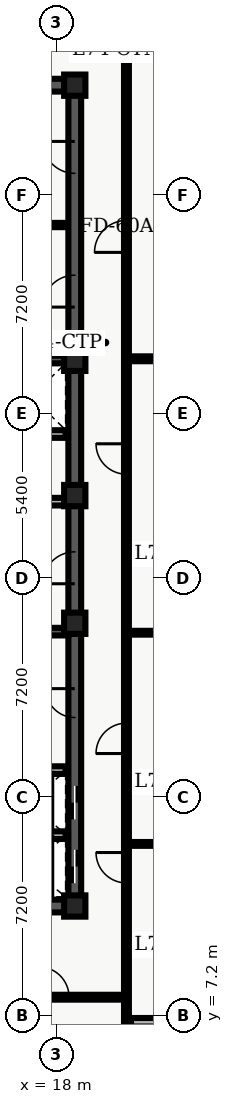
"""IFC4 building model, lengths in metres.
Left out: names, types, materials, properties, quantities, classifications, styles, units other than length and angle.
Written with IfcOpenShell. Run it as: python <this file> out.ifc"""

import sys

from ifc_helpers import new_model, entity, si_unit, converted_unit, direction, frame, origin_with_axes, origin_2d_with_axis, place, context, subcontext, project, spatial, polyline, rectangle, outline, extrude, element, fill, save


model = new_model("IFC4")
c1 = context("Model", 3, precision=1e-05, world=origin_with_axes(), true_north=direction((0.0, 1.0)))
c2 = subcontext(c1, "Body", "Model", "MODEL_VIEW")
j1 = project(units=[si_unit("LENGTHUNIT", "METRE"), converted_unit("PLANEANGLEUNIT", "DEGREE", entity("IfcPlaneAngleMeasure", 0.017), si_unit("PLANEANGLEUNIT", "RADIAN"), dimensions=[0, 0, 0, 0, 0, 0, 0])], contexts=[c1])
p1 = place(None, origin_with_axes())
s1 = spatial("IfcSite", under=j1, at=p1, CompositionType="ELEMENT")
p2 = place(p1, origin_with_axes())
s2 = spatial("IfcBuilding", under=s1, at=p2, CompositionType="ELEMENT")
p3 = place(p2, frame((0.0, 0.0, 299.7), z_axis=(0.0, 0.0, 1.0), x_axis=(1.0, 0.0, 0.0)))
s3 = spatial("IfcBuildingStorey", under=s2, at=p3, CompositionType="ELEMENT", Elevation=299.7)
p4 = place(p3, frame((11.4, 10.8, 0.0), z_axis=(0.0, 0.0, 1.0), x_axis=(1.0, 0.0, 0.0)))
e1 = element("IfcWall", 1, at=p4, inside=s3, PredefinedType="SHEAR", context=c2, shape_type="SweptSolid", body=[
    extrude(outline(polyline([(0.0, -0.21), (7.2, -0.21), (7.2, 0.21), (0.0, 0.21), (0.0, -0.21)])), origin_with_axes(), (0.0, 0.0, 1.0), 3.6),
])
p5 = place(p4, frame((2.625, 0.0, 0.0), z_axis=(0.0, 0.0, 1.0), x_axis=(1.0, 0.0, 0.0)))
e2 = element("IfcOpeningElement", 2, at=p5, cuts=e1, PredefinedType="OPENING", context=c2, shape_type="SweptSolid", body=[
    extrude(rectangle(XDim=1.05, YDim=0.44, at=origin_2d_with_axis()), origin_with_axes(), (0.0, 0.0, 1.0), 2.15),
])
p6 = place(p3, frame((11.4, 37.8, 0.0), z_axis=(0.0, 0.0, 1.0), x_axis=(1.0, 0.0, 0.0)))
e3 = element("IfcWall", 3, at=p6, inside=s3, PredefinedType="SHEAR", context=c2, shape_type="SweptSolid", body=[
    extrude(outline(polyline([(0.0, -0.21), (7.2, -0.21), (7.2, 0.21), (0.0, 0.21), (0.0, -0.21)])), origin_with_axes(), (0.0, 0.0, 1.0), 3.6),
])
p7 = place(p6, frame((2.625, 0.0, 0.0), z_axis=(0.0, 0.0, 1.0), x_axis=(1.0, 0.0, 0.0)))
e4 = element("IfcOpeningElement", 4, at=p7, cuts=e3, PredefinedType="OPENING", context=c2, shape_type="SweptSolid", body=[
    extrude(rectangle(XDim=1.05, YDim=0.44, at=origin_2d_with_axis()), origin_with_axes(), (0.0, 0.0, 1.0), 2.15),
])
p8 = place(p3, frame((18.6, 10.8, 0.0), z_axis=(0.0, 0.0, 1.0), x_axis=(0.0, 1.0, 0.0)))
e5 = element("IfcWall", 5, at=p8, inside=s3, PredefinedType="SHEAR", context=c2, shape_type="SweptSolid", body=[
    extrude(outline(polyline([(0.0, -0.21), (13.5, -0.21), (13.5, 0.21), (0.0, 0.21), (0.0, -0.21)])), origin_with_axes(), (0.0, 0.0, 1.0), 3.6),
])
p9 = place(p8, frame((1.3, 0.0, 0.0), z_axis=(0.0, 0.0, 1.0), x_axis=(1.0, 0.0, 0.0)))
e6 = element("IfcOpeningElement", 6, at=p9, cuts=e5, PredefinedType="OPENING", context=c2, shape_type="SweptSolid", body=[
    extrude(rectangle(XDim=1.1, YDim=0.44, at=origin_2d_with_axis()), origin_with_axes(), (0.0, 0.0, 1.0), 2.15),
])
p10 = place(p8, frame((3.4, 0.0, 0.0), z_axis=(0.0, 0.0, 1.0), x_axis=(1.0, 0.0, 0.0)))
e7 = element("IfcOpeningElement", 7, at=p10, cuts=e5, PredefinedType="OPENING", context=c2, shape_type="SweptSolid", body=[
    extrude(rectangle(XDim=1.1, YDim=0.44, at=origin_2d_with_axis()), origin_with_axes(), (0.0, 0.0, 1.0), 2.15),
])
p11 = place(p8, frame((11.125, 0.0, 0.0), z_axis=(0.0, 0.0, 1.0), x_axis=(1.0, 0.0, 0.0)))
e8 = element("IfcOpeningElement", 8, at=p11, cuts=e5, PredefinedType="OPENING", context=c2, shape_type="SweptSolid", body=[
    extrude(rectangle(XDim=1.05, YDim=0.44, at=origin_2d_with_axis()), origin_with_axes(), (0.0, 0.0, 1.0), 2.15),
])
p12 = place(p8, frame((6.675, 0.0, 0.0), z_axis=(0.0, 0.0, 1.0), x_axis=(1.0, 0.0, 0.0)))
e9 = element("IfcOpeningElement", 9, at=p12, cuts=e5, PredefinedType="OPENING", context=c2, shape_type="SweptSolid", body=[
    extrude(rectangle(XDim=0.95, YDim=0.44, at=origin_2d_with_axis()), origin_with_axes(), (0.0, 0.0, 1.0), 2.15),
])
p13 = place(p3, frame((18.6, 24.3, 0.0), z_axis=(0.0, 0.0, 1.0), x_axis=(0.0, 1.0, 0.0)))
e10 = element("IfcWall", 10, at=p13, inside=s3, PredefinedType="SHEAR", context=c2, shape_type="SweptSolid", body=[
    extrude(outline(polyline([(0.0, -0.21), (13.5, -0.21), (13.5, 0.21), (0.0, 0.21), (0.0, -0.21)])), origin_with_axes(), (0.0, 0.0, 1.0), 3.6),
])
p14 = place(p13, frame((6.725, 0.0, 0.0), z_axis=(0.0, 0.0, 1.0), x_axis=(1.0, 0.0, 0.0)))
e11 = element("IfcOpeningElement", 11, at=p14, cuts=e10, PredefinedType="OPENING", context=c2, shape_type="SweptSolid", body=[
    extrude(rectangle(XDim=1.05, YDim=0.44, at=origin_2d_with_axis()), origin_with_axes(), (0.0, 0.0, 1.0), 2.15),
])
p15 = place(p13, frame((11.125, 0.0, 0.0), z_axis=(0.0, 0.0, 1.0), x_axis=(1.0, 0.0, 0.0)))
e12 = element("IfcOpeningElement", 12, at=p15, cuts=e10, PredefinedType="OPENING", context=c2, shape_type="SweptSolid", body=[
    extrude(rectangle(XDim=1.05, YDim=0.44, at=origin_2d_with_axis()), origin_with_axes(), (0.0, 0.0, 1.0), 2.15),
])
for number, where, z_axis, x_axis in (
    (13, (11.61, 19.825, 0.0), (0.0, 0.0, 1.0), (1.0, 0.0, 0.0)),
    (14, (11.61, 28.775, 0.0), (0.0, 0.0, 1.0), (1.0, 0.0, 0.0)),
):
    element("IfcWall", number, at=place(p3, frame(where, z_axis=z_axis, x_axis=x_axis)), inside=s3, PredefinedType="SHEAR", context=c2, shape_type="SweptSolid", body=[
        extrude(outline(polyline([(0.0, -0.125), (6.78, -0.125), (6.78, 0.125), (0.0, 0.125), (0.0, -0.125)])), origin_with_axes(), (0.0, 0.0, 1.0), 3.6),
    ])
p16 = place(p3, frame((11.7, 24.1, 0.0), z_axis=(0.0, 0.0, 1.0), x_axis=(1.0, 0.0, 0.0)))
e15 = element("IfcWall", 15, at=p16, inside=s3, PredefinedType="SOLIDWALL", context=c2, shape_type="SweptSolid", body=[
    extrude(outline(polyline([(0.0, -0.125), (6.6, -0.125), (6.6, 0.125), (0.0, 0.125), (0.0, -0.125)])), origin_with_axes(), (0.0, 0.0, 1.0), 2.64),
])
p17 = place(p16, frame((3.6, 0.0, 0.0), z_axis=(0.0, 0.0, 1.0), x_axis=(1.0, 0.0, 0.0)))
e16 = element("IfcOpeningElement", 16, at=p17, cuts=e15, PredefinedType="OPENING", context=c2, shape_type="SweptSolid", body=[
    extrude(rectangle(XDim=0.9, YDim=0.27, at=origin_2d_with_axis()), origin_with_axes(), (0.0, 0.0, 1.0), 2.15),
])
p18 = place(p16, frame((5.65, 0.0, 0.0), z_axis=(0.0, 0.0, 1.0), x_axis=(1.0, 0.0, 0.0)))
e17 = element("IfcOpeningElement", 17, at=p18, cuts=e15, PredefinedType="OPENING", context=c2, shape_type="SweptSolid", body=[
    extrude(rectangle(XDim=0.9, YDim=0.27, at=origin_2d_with_axis()), origin_with_axes(), (0.0, 0.0, 1.0), 2.15),
])
p19 = place(p3, frame((11.7, 26.325, 0.0), z_axis=(0.0, 0.0, 1.0), x_axis=(1.0, 0.0, 0.0)))
e18 = element("IfcWall", 18, at=p19, inside=s3, PredefinedType="SOLIDWALL", context=c2, shape_type="SweptSolid", body=[
    extrude(outline(polyline([(0.0, -0.125), (6.6, -0.125), (6.6, 0.125), (0.0, 0.125), (0.0, -0.125)])), origin_with_axes(), (0.0, 0.0, 1.0), 2.64),
])
p20 = place(p19, frame((3.5, 0.0, 0.0), z_axis=(0.0, 0.0, 1.0), x_axis=(1.0, 0.0, 0.0)))
e19 = element("IfcOpeningElement", 19, at=p20, cuts=e18, PredefinedType="OPENING", context=c2, shape_type="SweptSolid", body=[
    extrude(rectangle(XDim=0.9, YDim=0.27, at=origin_2d_with_axis()), origin_with_axes(), (0.0, 0.0, 1.0), 2.15),
])
for number, where, z_axis, x_axis in (
    (20, (18.6, 10.8, 0.0), (0.0, 0.0, 1.0), (1.0, 0.0, 0.0)),
    (21, (18.6, 20.1, 0.0), (0.0, 0.0, 1.0), (1.0, 0.0, 0.0)),
    (22, (18.6, 24.3, 0.0), (0.0, 0.0, 1.0), (1.0, 0.0, 0.0)),
    (23, (18.6, 28.75, 0.0), (0.0, 0.0, 1.0), (1.0, 0.0, 0.0)),
    (24, (18.6, 37.8, 0.0), (0.0, 0.0, 1.0), (1.0, 0.0, 0.0)),
):
    element("IfcColumn", number, at=place(p3, frame(where, z_axis=z_axis, x_axis=x_axis)), inside=s3, PredefinedType="COLUMN", context=c2, shape_type="SweptSolid", body=[
        extrude(rectangle(XDim=0.7, YDim=0.7, at=origin_2d_with_axis()), origin_with_axes(), (0.0, 0.0, 1.0), 3.9),
    ])
for number, where, z_axis, x_axis in (
    (25, (15.84, 13.13, 0.0), (0.0, 0.0, 1.0), (1.0, 0.0, 0.0)),
    (26, (15.84, 15.27, 0.0), (0.0, 0.0, 1.0), (1.0, 0.0, 0.0)),
):
    element("IfcWall", number, at=place(p3, frame(where, z_axis=z_axis, x_axis=x_axis)), inside=s3, PredefinedType="SOLIDWALL", context=c2, shape_type="SweptSolid", body=[
        extrude(outline(polyline([(0.0, -0.125), (2.46, -0.125), (2.46, 0.125), (0.0, 0.125), (0.0, -0.125)])), origin_with_axes(), (0.0, 0.0, 1.0), 2.64),
    ])
p21 = place(p3, frame((15.84, 33.2, 0.0), z_axis=(0.0, 0.0, 1.0), x_axis=(1.0, 0.0, 0.0)))
e27 = element("IfcWall", 27, at=p21, inside=s3, PredefinedType="PARTITIONING", context=c2, shape_type="SweptSolid", body=[
    extrude(outline(polyline([(0.0, -0.07), (2.46, -0.07), (2.46, 0.07), (0.0, 0.07), (0.0, -0.07)])), origin_with_axes(), (0.0, 0.0, 1.0), 2.64),
])
p22 = place(p3, frame((8.135, 7.8, 0.0), z_axis=(0.0, 0.0, 1.0), x_axis=(1.0, 0.0, 0.0)))
e28 = element("IfcWall", 28, at=p22, inside=s3, PredefinedType="PARTITIONING", context=c2, shape_type="SweptSolid", body=[
    extrude(outline(polyline([(0.0, -0.08), (12.165, -0.08), (12.165, 0.08), (0.0, 0.08), (0.0, -0.08)])), origin_with_axes(), (0.0, 0.0, 1.0), 2.64),
])
p23 = place(p22, frame((0.89, 0.0, 0.0), z_axis=(0.0, 0.0, 1.0), x_axis=(1.0, 0.0, 0.0)))
e29 = element("IfcOpeningElement", 29, at=p23, cuts=e28, PredefinedType="OPENING", context=c2, shape_type="SweptSolid", body=[
    extrude(rectangle(XDim=1.0, YDim=0.18, at=origin_2d_with_axis()), origin_with_axes(), (0.0, 0.0, 1.0), 2.15),
])
p24 = place(p22, frame((5.482, 0.0, 0.0), z_axis=(0.0, 0.0, 1.0), x_axis=(1.0, 0.0, 0.0)))
e30 = element("IfcOpeningElement", 30, at=p24, cuts=e28, PredefinedType="OPENING", context=c2, shape_type="SweptSolid", body=[
    extrude(rectangle(XDim=1.0, YDim=0.18, at=origin_2d_with_axis()), origin_with_axes(), (0.0, 0.0, 1.0), 2.15),
])
p25 = place(p22, frame((9.777, 0.0, 0.0), z_axis=(0.0, 0.0, 1.0), x_axis=(1.0, 0.0, 0.0)))
e31 = element("IfcOpeningElement", 31, at=p25, cuts=e28, PredefinedType="OPENING", context=c2, shape_type="SweptSolid", body=[
    extrude(rectangle(XDim=1.0, YDim=0.18, at=origin_2d_with_axis()), origin_with_axes(), (0.0, 0.0, 1.0), 2.15),
])
p26 = place(p3, frame((20.3, 2.14, 0.0), z_axis=(0.0, 0.0, 1.0), x_axis=(0.0, 1.0, 0.0)))
e32 = element("IfcWall", 32, at=p26, inside=s3, PredefinedType="PARTITIONING", context=c2, shape_type="SweptSolid", body=[
    extrude(outline(polyline([(0.0, -0.08), (38.36, -0.08), (38.36, 0.08), (0.0, 0.08), (0.0, -0.08)])), origin_with_axes(), (0.0, 0.0, 1.0), 2.64),
])
p27 = place(p26, frame((30.685, 0.0, 0.0), z_axis=(0.0, 0.0, 1.0), x_axis=(1.0, 0.0, 0.0)))
e33 = element("IfcOpeningElement", 33, at=p27, cuts=e32, PredefinedType="OPENING", context=c2, shape_type="SweptSolid", body=[
    extrude(rectangle(XDim=1.05, YDim=0.18, at=origin_2d_with_axis()), origin_with_axes(), (0.0, 0.0, 1.0), 2.15),
])
p28 = place(p26, frame((2.683, 0.0, 0.0), z_axis=(0.0, 0.0, 1.0), x_axis=(1.0, 0.0, 0.0)))
e34 = element("IfcOpeningElement", 34, at=p28, cuts=e32, PredefinedType="OPENING", context=c2, shape_type="SweptSolid", body=[
    extrude(rectangle(XDim=1.0, YDim=0.18, at=origin_2d_with_axis()), origin_with_axes(), (0.0, 0.0, 1.0), 2.15),
])
p29 = place(p26, frame((9.919, 0.0, 0.0), z_axis=(0.0, 0.0, 1.0), x_axis=(1.0, 0.0, 0.0)))
e35 = element("IfcOpeningElement", 35, at=p29, cuts=e32, PredefinedType="OPENING", context=c2, shape_type="SweptSolid", body=[
    extrude(rectangle(XDim=1.0, YDim=0.18, at=origin_2d_with_axis()), origin_with_axes(), (0.0, 0.0, 1.0), 2.15),
])
p30 = place(p26, frame((14.175, 0.0, 0.0), z_axis=(0.0, 0.0, 1.0), x_axis=(1.0, 0.0, 0.0)))
e36 = element("IfcOpeningElement", 36, at=p30, cuts=e32, PredefinedType="OPENING", context=c2, shape_type="SweptSolid", body=[
    extrude(rectangle(XDim=1.0, YDim=0.18, at=origin_2d_with_axis()), origin_with_axes(), (0.0, 0.0, 1.0), 2.15),
])
p31 = place(p26, frame((23.364, 0.0, 0.0), z_axis=(0.0, 0.0, 1.0), x_axis=(1.0, 0.0, 0.0)))
e37 = element("IfcOpeningElement", 37, at=p31, cuts=e32, PredefinedType="OPENING", context=c2, shape_type="SweptSolid", body=[
    extrude(rectangle(XDim=1.0, YDim=0.18, at=origin_2d_with_axis()), origin_with_axes(), (0.0, 0.0, 1.0), 2.15),
])
p32 = place(p3, frame((20.3, 28.8, 0.0), z_axis=(0.0, 0.0, 1.0), x_axis=(1.0, 0.0, 0.0)))
e38 = element("IfcWall", 38, at=p32, inside=s3, PredefinedType="PARTITIONING", context=c2, shape_type="SweptSolid", body=[
    extrude(outline(polyline([(0.0, -0.08), (3.32, -0.08), (3.32, 0.08), (0.0, 0.08), (0.0, -0.08)])), origin_with_axes(), (0.0, 0.0, 1.0), 2.64),
])
p33 = place(p3, frame((20.45, 6.976, 0.0), z_axis=(0.0, 0.0, 1.0), x_axis=(1.0, 0.0, 0.0)))
e39 = element("IfcWall", 39, at=p33, inside=s3, PredefinedType="PARTITIONING", context=c2, shape_type="SweptSolid", body=[
    extrude(outline(polyline([(0.0, -0.14), (13.415, -0.14), (13.415, 0.14), (0.0, 0.14), (0.0, -0.14)])), origin_with_axes(), (0.0, 0.0, 1.0), 2.64),
])
for number, where, z_axis, x_axis in (
    (40, (20.45, 12.842, 0.0), (0.0, 0.0, 1.0), (1.0, 0.0, 0.0)),
    (41, (20.45, 19.789, 0.0), (0.0, 0.0, 1.0), (1.0, 0.0, 0.0)),
):
    element("IfcWall", number, at=place(p3, frame(where, z_axis=z_axis, x_axis=x_axis)), inside=s3, PredefinedType="PARTITIONING", context=c2, shape_type="SweptSolid", body=[
        extrude(outline(polyline([(0.0, -0.062), (13.415, -0.062), (13.415, 0.062), (0.0, 0.062), (0.0, -0.062)])), origin_with_axes(), (0.0, 0.0, 1.0), 2.64),
    ])
p34 = place(p8, frame((1.3, 0.0, 0.0), z_axis=(0.0, 0.0, 1.0), x_axis=(1.0, 0.0, 0.0)))
e42 = element("IfcDoor", 42, at=p34, inside=s3, OperationType="SLIDING_TO_LEFT", PredefinedType="DOOR", context=c2, shape_type="SweptSolid", body=[
    extrude(rectangle(XDim=1.1, YDim=0.09, at=origin_2d_with_axis()), origin_with_axes(), (0.0, 0.0, 1.0), 2.15),
])
fill(e6, e42)
p35 = place(p8, frame((3.4, 0.0, 0.0), z_axis=(0.0, 0.0, 1.0), x_axis=(1.0, 0.0, 0.0)))
e43 = element("IfcDoor", 43, at=p35, inside=s3, OperationType="SLIDING_TO_RIGHT", PredefinedType="DOOR", context=c2, shape_type="SweptSolid", body=[
    extrude(rectangle(XDim=1.1, YDim=0.09, at=origin_2d_with_axis()), origin_with_axes(), (0.0, 0.0, 1.0), 2.15),
])
fill(e7, e43)
p36 = place(p8, frame((11.125, 0.0, 0.0), z_axis=(0.0, 0.0, 1.0), x_axis=(1.0, 0.0, 0.0)))
e44 = element("IfcDoor", 44, at=p36, inside=s3, OperationType="SINGLE_SWING_LEFT", PredefinedType="DOOR", context=c2, shape_type="SweptSolid", body=[
    extrude(rectangle(XDim=1.05, YDim=0.09, at=origin_2d_with_axis()), origin_with_axes(), (0.0, 0.0, 1.0), 2.15),
])
fill(e8, e44)
p37 = place(p8, frame((6.675, 0.0, 0.0), z_axis=(0.0, 0.0, 1.0), x_axis=(1.0, 0.0, 0.0)))
e45 = element("IfcDoor", 45, at=p37, inside=s3, OperationType="SINGLE_SWING_RIGHT", PredefinedType="DOOR", context=c2, shape_type="SweptSolid", body=[
    extrude(rectangle(XDim=0.95, YDim=0.09, at=origin_2d_with_axis()), origin_with_axes(), (0.0, 0.0, 1.0), 2.15),
])
fill(e9, e45)
p38 = place(p13, frame((6.725, 0.0, 0.0), z_axis=(0.0, 0.0, 1.0), x_axis=(1.0, 0.0, 0.0)))
e46 = element("IfcDoor", 46, at=p38, inside=s3, OperationType="SINGLE_SWING_LEFT", PredefinedType="DOOR", context=c2, shape_type="SweptSolid", body=[
    extrude(rectangle(XDim=1.05, YDim=0.09, at=origin_2d_with_axis()), origin_with_axes(), (0.0, 0.0, 1.0), 2.15),
])
fill(e11, e46)
p39 = place(p13, frame((11.125, 0.0, 0.0), z_axis=(0.0, 0.0, 1.0), x_axis=(1.0, 0.0, 0.0)))
e47 = element("IfcDoor", 47, at=p39, inside=s3, OperationType="SINGLE_SWING_RIGHT", PredefinedType="DOOR", context=c2, shape_type="SweptSolid", body=[
    extrude(rectangle(XDim=1.05, YDim=0.09, at=origin_2d_with_axis()), origin_with_axes(), (0.0, 0.0, 1.0), 2.15),
])
fill(e12, e47)
p40 = place(p26, frame((30.685, 0.0, 0.0), z_axis=(0.0, 0.0, 1.0), x_axis=(1.0, 0.0, 0.0)))
e48 = element("IfcDoor", 48, at=p40, inside=s3, OperationType="SINGLE_SWING_LEFT", PredefinedType="DOOR", context=c2, shape_type="SweptSolid", body=[
    extrude(rectangle(XDim=1.05, YDim=0.09, at=origin_2d_with_axis()), origin_with_axes(), (0.0, 0.0, 1.0), 2.15),
])
fill(e33, e48)
p41 = place(p22, frame((9.777, 0.0, 0.0), z_axis=(0.0, 0.0, 1.0), x_axis=(1.0, 0.0, 0.0)))
e49 = element("IfcDoor", 49, at=p41, inside=s3, OperationType="SINGLE_SWING_LEFT", PredefinedType="DOOR", context=c2, shape_type="SweptSolid", body=[
    extrude(rectangle(XDim=1.0, YDim=0.09, at=origin_2d_with_axis()), origin_with_axes(), (0.0, 0.0, 1.0), 2.15),
])
fill(e31, e49)
p42 = place(p26, frame((9.919, 0.0, 0.0), z_axis=(0.0, 0.0, 1.0), x_axis=(1.0, 0.0, 0.0)))
e50 = element("IfcDoor", 50, at=p42, inside=s3, OperationType="SINGLE_SWING_RIGHT", PredefinedType="DOOR", context=c2, shape_type="SweptSolid", body=[
    extrude(rectangle(XDim=1.0, YDim=0.09, at=origin_2d_with_axis()), origin_with_axes(), (0.0, 0.0, 1.0), 2.15),
])
fill(e35, e50)
p43 = place(p26, frame((14.175, 0.0, 0.0), z_axis=(0.0, 0.0, 1.0), x_axis=(1.0, 0.0, 0.0)))
e51 = element("IfcDoor", 51, at=p43, inside=s3, OperationType="SINGLE_SWING_LEFT", PredefinedType="DOOR", context=c2, shape_type="SweptSolid", body=[
    extrude(rectangle(XDim=1.0, YDim=0.09, at=origin_2d_with_axis()), origin_with_axes(), (0.0, 0.0, 1.0), 2.15),
])
fill(e36, e51)
p44 = place(p26, frame((23.364, 0.0, 0.0), z_axis=(0.0, 0.0, 1.0), x_axis=(1.0, 0.0, 0.0)))
e52 = element("IfcDoor", 52, at=p44, inside=s3, OperationType="SINGLE_SWING_RIGHT", PredefinedType="DOOR", context=c2, shape_type="SweptSolid", body=[
    extrude(rectangle(XDim=1.0, YDim=0.09, at=origin_2d_with_axis()), origin_with_axes(), (0.0, 0.0, 1.0), 2.15),
])
fill(e37, e52)
save(model, sys.argv[1])
